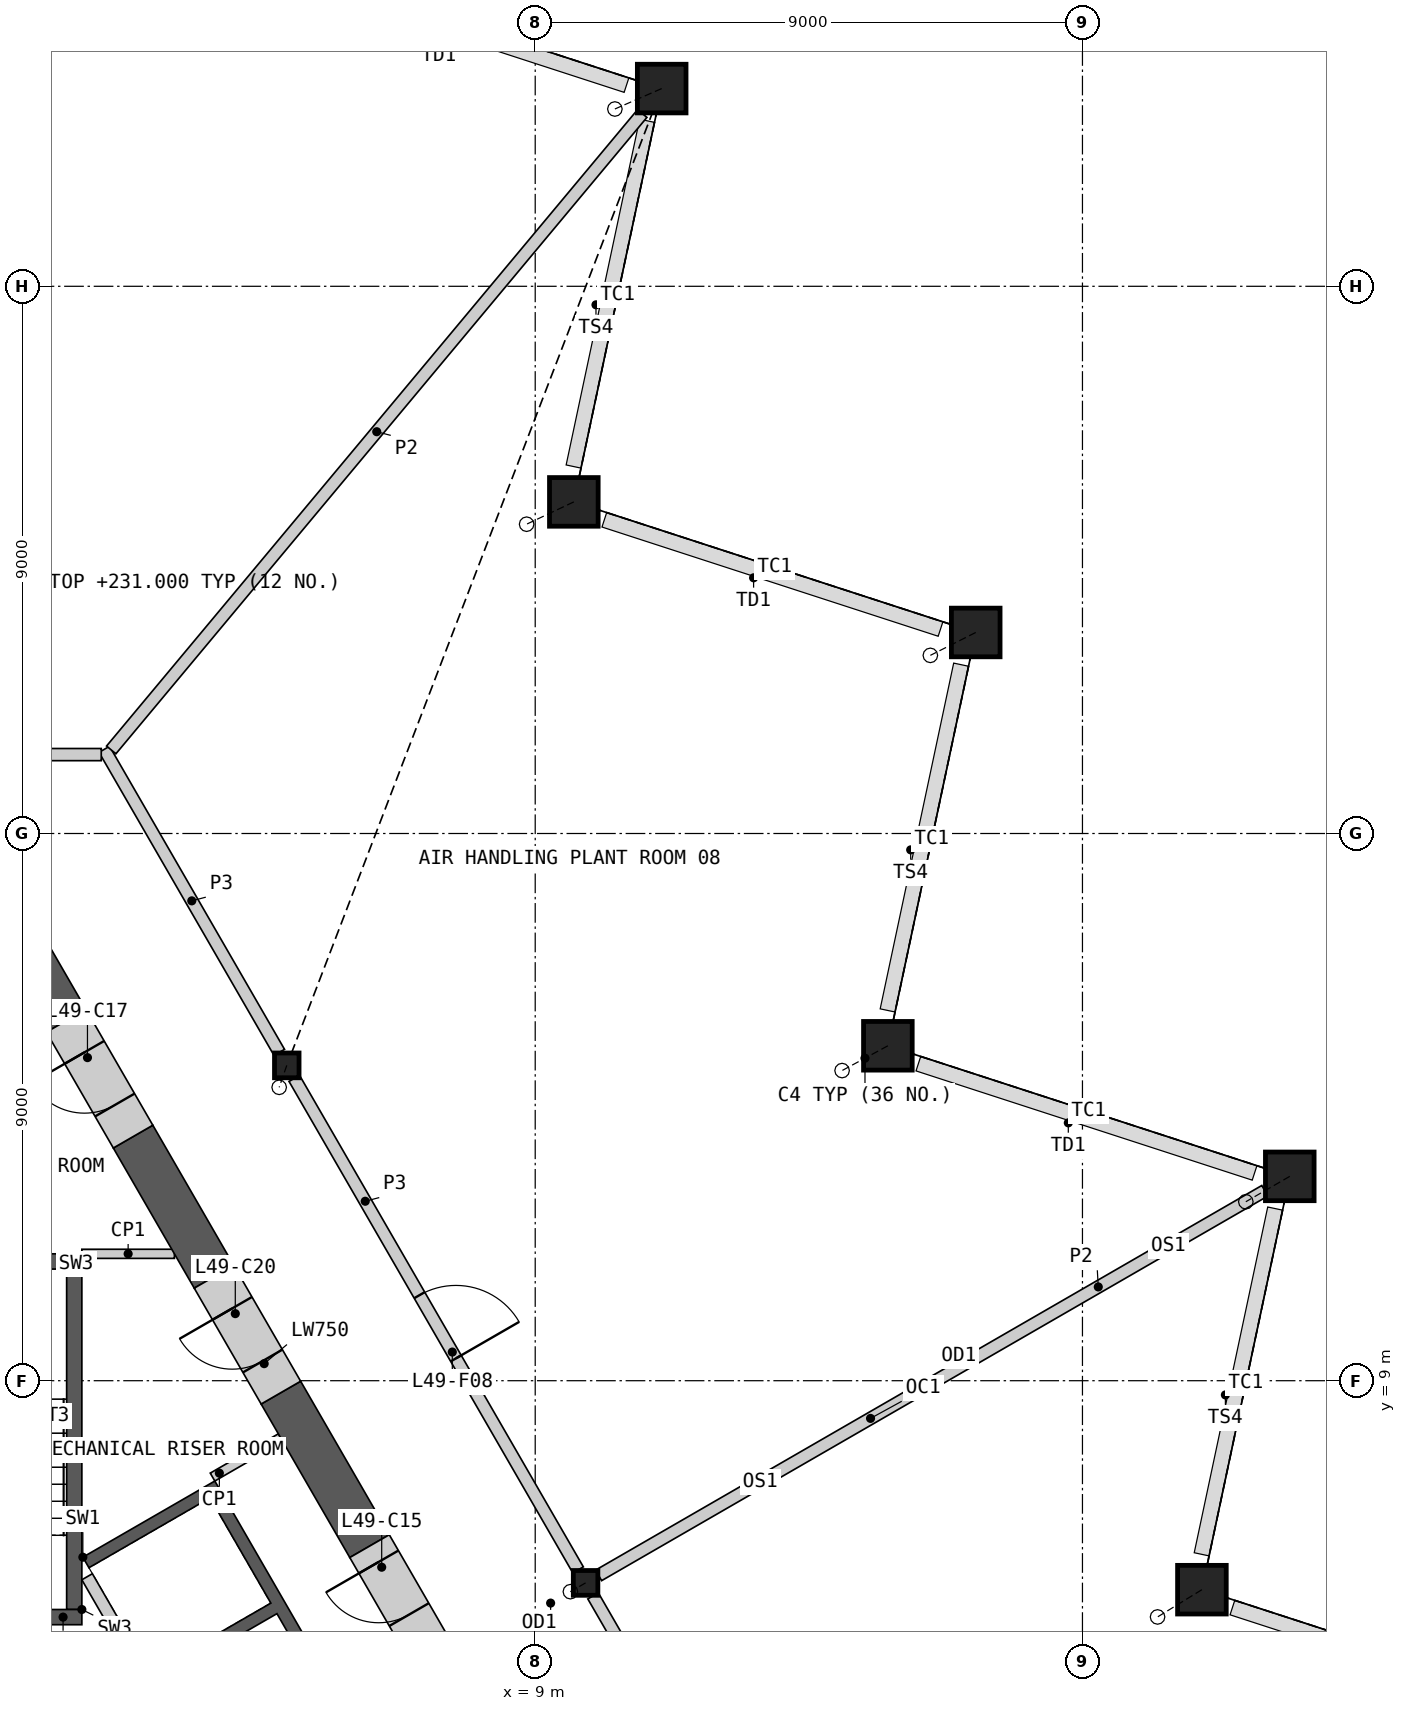
"""IFC4 building model, lengths in metres.
Left out: names, types, materials, properties, quantities, classifications, styles, units other than length and angle.
Written with IfcOpenShell. Run it as: python <this file> out.ifc"""

import sys

from ifc_helpers import new_model, si_unit, direction, frame, frame_2d, origin, origin_2d, place, context, subcontext, project, spatial, polyline, rectangle, hollow_rectangle, i_section, outline, extrude, element, fill, save


model = new_model("IFC4")
c1 = context("Model", 3, precision=1e-05, world=origin(), true_north=direction((0.0, 1.0)))
c2 = subcontext(c1, "Body", "Model", "MODEL_VIEW")
j1 = project(units=[si_unit("LENGTHUNIT", "METRE"), si_unit("PLANEANGLEUNIT", "RADIAN")], contexts=[c1])
p1 = place(None, origin())
s1 = spatial("IfcSite", under=j1, at=p1, CompositionType="ELEMENT")
p2 = place(p1, origin())
s2 = spatial("IfcBuilding", under=s1, at=p2, CompositionType="ELEMENT")
p3 = place(p2, frame((0.0, 0.0, 226.0)))
s3 = spatial("IfcBuildingStorey", under=s2, at=p3, CompositionType="ELEMENT", Elevation=226.0)
p4 = place(p3, frame((19.965, 5.563, 0.0), z_axis=(-0.143805256431, -0.088362266, 0.985653163222), x_axis=(0.52352457136, -0.852010576919, 0.0)))
e1 = element("IfcColumn", 1, at=p4, inside=s3, PredefinedType="COLUMN", context=c2, shape_type="SweptSolid", body=[
    extrude(hollow_rectangle(XDim=0.8, YDim=0.8, WallThickness=0.05, at=origin_2d()), frame((0.0, 0.0, 0.069)), (0.0, 0.0, 1.0), 4.936),
])
p5 = place(p3, frame((21.409, 12.361, 0.0), z_axis=(-0.142558983537, -0.082356710084, 0.986354048259), x_axis=(0.500228859883, -0.865893231143, 0.0)))
e2 = element("IfcColumn", 2, at=p5, inside=s3, PredefinedType="COLUMN", context=c2, shape_type="SweptSolid", body=[
    extrude(hollow_rectangle(XDim=0.8, YDim=0.8, WallThickness=0.05, at=origin_2d()), frame((0.0, 0.0, 0.067)), (0.0, 0.0, 1.0), 4.936),
])
p6 = place(p3, frame((14.8, 14.508, 0.0), z_axis=(-0.14842592214, -0.080325182896, 0.98565592913), x_axis=(0.475952391662, -0.879471046067, 0.0)))
e3 = element("IfcColumn", 3, at=p6, inside=s3, PredefinedType="COLUMN", context=c2, shape_type="SweptSolid", body=[
    extrude(hollow_rectangle(XDim=0.8, YDim=0.8, WallThickness=0.05, at=origin_2d()), frame((0.0, 0.0, 0.069)), (0.0, 0.0, 1.0), 4.936),
])
p7 = place(p3, frame((16.245, 21.306, 0.0), z_axis=(-0.147223782271, -0.074310204791, 0.986307838049), x_axis=(0.450597903076, -0.892727018603, 0.0)))
e4 = element("IfcColumn", 4, at=p7, inside=s3, PredefinedType="COLUMN", context=c2, shape_type="SweptSolid", body=[
    extrude(hollow_rectangle(XDim=0.8, YDim=0.8, WallThickness=0.05, at=origin_2d()), frame((0.0, 0.0, 0.067)), (0.0, 0.0, 1.0), 4.936),
])
p8 = place(p3, frame((9.635, 23.454, 0.0), z_axis=(-0.153080457926, -0.072281310218, 0.985566733202), x_axis=(0.426974022071, -0.90426389095, 0.0)))
e5 = element("IfcColumn", 5, at=p8, inside=s3, PredefinedType="COLUMN", context=c2, shape_type="SweptSolid", body=[
    extrude(hollow_rectangle(XDim=0.8, YDim=0.8, WallThickness=0.05, at=origin_2d()), frame((0.0, 0.0, 0.069)), (0.0, 0.0, 1.0), 4.936),
])
p9 = place(p3, frame((11.08, 30.252, 0.0), z_axis=(-0.151827964883, -0.066259207003, 0.986183546084), x_axis=(0.399979973786, -0.916523878887, 0.0)))
e6 = element("IfcColumn", 6, at=p9, inside=s3, PredefinedType="COLUMN", context=c2, shape_type="SweptSolid", body=[
    extrude(hollow_rectangle(XDim=0.8, YDim=0.8, WallThickness=0.05, at=origin_2d()), frame((0.0, 0.0, 0.067)), (0.0, 0.0, 1.0), 4.936),
])
p10 = place(p3, frame((9.828, 5.675, 0.0), z_axis=(-0.049916818753, -0.028858160841, 0.998336375055), x_axis=(0.500502949238, -0.865734831114, 0.0)))
e7 = element("IfcColumn", 7, at=p10, inside=s3, PredefinedType="COLUMN", context=c2, shape_type="SweptSolid", body=[
    extrude(i_section(OverallWidth=0.404, OverallDepth=0.407, WebThickness=0.027, FlangeThickness=0.044, at=origin_2d()), frame((0.0, 0.0, 0.012)), (0.0, 0.0, 1.0), 4.985),
])
p11 = place(p3, frame((4.914, 14.186, 0.0), z_axis=(-0.024927314899, -0.072006833468, 0.997092595954), x_axis=(0.944978476916, -0.327132508574, 0.0)))
e8 = element("IfcColumn", 8, at=p11, inside=s3, PredefinedType="COLUMN", context=c2, shape_type="SweptSolid", body=[
    extrude(i_section(OverallWidth=0.404, OverallDepth=0.407, WebThickness=0.027, FlangeThickness=0.044, at=origin_2d()), frame((0.0, 0.0, 0.016)), (0.0, 0.0, 1.0), 4.983),
])
p12 = place(p3, origin())
e9 = element("IfcWall", 9, at=p12, inside=s3, PredefinedType="SHEAR", context=c2, shape_type="SweptSolid", body=[
    extrude(outline(polyline([(1.561, 6.097), (3.731, 7.35), (7.131, 1.461), (4.96, 0.208), (4.861, 0.381), (6.852, 1.531), (4.752, 5.169), (2.76, 4.019), (2.66, 4.192), (4.652, 5.342), (3.652, 7.074), (1.66, 5.924), (1.561, 6.097)])), origin(), (0.0, 0.0, 1.0), 4.65),
])
p13 = place(p3, frame((5.817, -1.476, 0.0), z_axis=(0.0, 0.0, 1.0), x_axis=(-0.500002616675, 0.866023893041, 0.0)))
e10 = element("IfcWall", 10, at=p13, inside=s3, PredefinedType="SOLIDWALL", context=c2, shape_type="SweptSolid", body=[
    extrude(rectangle(XDim=8.373, YDim=0.2, at=frame_2d((4.187, 0.0))), origin(), (0.0, 0.0, 1.0), 4.65),
])
p14 = place(p13, frame((0.437, 0.0, 0.0)))
e11 = element("IfcOpeningElement", 11, at=p14, cuts=e10, PredefinedType="OPENING", context=c2, shape_type="SweptSolid", body=[
    extrude(rectangle(XDim=0.9, YDim=2.1, at=frame_2d((0.45, 1.05))), frame((0.0, 0.11, 0.0), z_axis=(0.0, -1.0, 0.0), x_axis=(1.0, 0.0, 0.0)), (0.0, 0.0, 1.0), 0.22),
])
p15 = place(p13, frame((3.737, 0.0, 0.0)))
e12 = element("IfcOpeningElement", 12, at=p15, cuts=e10, PredefinedType="OPENING", context=c2, shape_type="SweptSolid", body=[
    extrude(rectangle(XDim=0.9, YDim=2.1, at=frame_2d((0.45, 1.05))), frame((0.0, 0.11, 0.0), z_axis=(0.0, -1.0, 0.0), x_axis=(1.0, 0.0, 0.0)), (0.0, 0.0, 1.0), 0.22),
])
p16 = place(p3, origin())
e13 = element("IfcWall", 13, at=p16, inside=s3, PredefinedType="SHEAR", context=c2, shape_type="SweptSolid", body=[
    extrude(outline(polyline([(1.544, 5.237), (1.544, 11.087), (1.294, 10.837), (1.294, 5.237), (1.544, 5.237)])), origin(), (0.0, 0.0, 1.0), 4.65),
])
p17 = place(p3, origin())
e14 = element("IfcWall", 14, at=p17, inside=s3, PredefinedType="SHEAR", context=c2, shape_type="SweptSolid", body=[
    extrude(outline(polyline([(1.544, 11.087), (-1.544, 11.087), (-1.294, 10.837), (1.294, 10.837), (1.544, 11.087)])), origin(), (0.0, 0.0, 1.0), 4.65),
])
p18 = place(p3, frame((1.544, 5.112, 0.0), z_axis=(0.0, 0.0, 1.0), x_axis=(-1.0, 0.0, 0.0)))
e15 = element("IfcWall", 15, at=p18, inside=s3, PredefinedType="SHEAR", context=c2, shape_type="SweptSolid", body=[
    extrude(rectangle(XDim=3.088, YDim=0.25, at=frame_2d((1.544, 0.0))), origin(), (0.0, 0.0, 1.0), 4.65),
])
p19 = place(p18, frame((0.994, 0.0, 0.0)))
e16 = element("IfcOpeningElement", 16, at=p19, cuts=e15, PredefinedType="OPENING", context=c2, shape_type="SweptSolid", body=[
    extrude(rectangle(XDim=1.1, YDim=2.1, at=frame_2d((0.55, 1.05))), frame((0.0, 0.135, 0.0), z_axis=(0.0, -1.0, 0.0), x_axis=(1.0, 0.0, 0.0)), (0.0, 0.0, 1.0), 0.27),
])
p20 = place(p3, frame((3.693, 7.415, 0.0), z_axis=(0.0, 0.0, 1.0), x_axis=(0.866003189247, 0.500038474733, 0.0)))
e17 = element("IfcWall", 17, at=p20, inside=s3, PredefinedType="PARTITIONING", context=c2, shape_type="SweptSolid", body=[
    extrude(rectangle(XDim=1.293, YDim=0.15, at=frame_2d((0.646, 0.0))), origin(), (0.0, 0.0, 1.0), 4.65),
])
p21 = place(p3, frame((1.544, 11.087, 0.0), z_axis=(0.0, 0.0, 1.0), x_axis=(1.0, 0.0, 0.0)))
e18 = element("IfcWall", 18, at=p21, inside=s3, PredefinedType="PARTITIONING", context=c2, shape_type="SweptSolid", body=[
    extrude(rectangle(XDim=1.522, YDim=0.15, at=frame_2d((0.761, 0.0))), origin(), (0.0, 0.0, 1.0), 4.65),
])
p22 = place(p3, frame((6.275, 6.279, 0.0), z_axis=(0.0, 0.0, 1.0), x_axis=(-0.500029273391, 0.866008502124, 0.0)))
e19 = element("IfcWall", 19, at=p22, inside=s3, PredefinedType="SHEAR", context=c2, shape_type="SweptSolid", body=[
    extrude(rectangle(XDim=2.916, YDim=0.75, at=frame_2d((1.458, 0.0))), origin(), (0.0, 0.0, 1.0), 4.65),
])
p23 = place(p3, frame((3.717, 10.709, 0.0), z_axis=(0.0, 0.0, 1.0), x_axis=(-0.500005599468, 0.866022170906, 0.0)))
e20 = element("IfcWall", 20, at=p23, inside=s3, PredefinedType="SHEAR", context=c2, shape_type="SweptSolid", body=[
    extrude(rectangle(XDim=2.662, YDim=0.75, at=frame_2d((1.331, 0.0))), origin(), (0.0, 0.0, 1.0), 4.65),
])
p24 = place(p3, frame((1.286, 14.92, 0.0), z_axis=(0.0, 0.0, 1.0), x_axis=(-0.500030129425, 0.866008007854, 0.0)))
e21 = element("IfcWall", 21, at=p24, inside=s3, PredefinedType="SHEAR", context=c2, shape_type="SweptSolid", body=[
    extrude(rectangle(XDim=1.923, YDim=0.75, at=frame_2d((0.962, 0.0))), origin(), (0.0, 0.0, 1.0), 4.65),
])
p25 = place(p3, frame((7.375, 4.374, 0.0), z_axis=(0.0, 0.0, 1.0), x_axis=(-0.499946605688, 0.86605622881, 0.0)))
e22 = element("IfcWall", 22, at=p25, inside=s3, PredefinedType="SHEAR", context=c2, shape_type="SweptSolid", body=[
    extrude(rectangle(XDim=2.2, YDim=0.75, at=frame_2d((1.1, 0.0))), origin(), (0.0, 0.0, 1.0), 4.65),
])
p26 = place(p25, frame((0.9, 0.0, 0.0)))
e23 = element("IfcOpeningElement", 23, at=p26, cuts=e22, PredefinedType="OPENING", context=c2, shape_type="SweptSolid", body=[
    extrude(rectangle(XDim=1.0, YDim=2.1, at=frame_2d((0.5, 1.05))), frame((0.0, 0.385, 0.0), z_axis=(0.0, -1.0, 0.0), x_axis=(1.0, 0.0, 0.0)), (0.0, 0.0, 1.0), 0.77),
])
p27 = place(p3, frame((2.386, 13.015, 0.0), z_axis=(0.0, 0.0, 1.0), x_axis=(-0.499946605688, 0.86605622881, 0.0)))
e24 = element("IfcWall", 24, at=p27, inside=s3, PredefinedType="SHEAR", context=c2, shape_type="SweptSolid", body=[
    extrude(rectangle(XDim=2.2, YDim=0.75, at=frame_2d((1.1, 0.0))), origin(), (0.0, 0.0, 1.0), 4.65),
])
p28 = place(p27, frame((0.6, 0.0, 0.0)))
e25 = element("IfcOpeningElement", 25, at=p28, cuts=e24, PredefinedType="OPENING", context=c2, shape_type="SweptSolid", body=[
    extrude(rectangle(XDim=1.0, YDim=2.1, at=frame_2d((0.5, 1.05))), frame((0.0, 0.385, 0.0), z_axis=(0.0, -1.0, 0.0), x_axis=(1.0, 0.0, 0.0)), (0.0, 0.0, 1.0), 0.77),
])
p29 = place(p3, frame((4.817, 8.804, 0.0), z_axis=(0.0, 0.0, 1.0), x_axis=(-0.50002983664, 0.866008176907, 0.0)))
e26 = element("IfcWall", 26, at=p29, inside=s3, PredefinedType="SHEAR", context=c2, shape_type="SweptSolid", body=[
    extrude(rectangle(XDim=2.2, YDim=0.75, at=frame_2d((1.1, 0.0))), origin(), (0.0, 0.0, 1.0), 4.65),
])
p30 = place(p29, frame((0.6, 0.0, 0.0)))
e27 = element("IfcOpeningElement", 27, at=p30, cuts=e26, PredefinedType="OPENING", context=c2, shape_type="SweptSolid", body=[
    extrude(rectangle(XDim=1.0, YDim=2.1, at=frame_2d((0.5, 1.05))), frame((0.0, 0.385, 0.0), z_axis=(0.0, -1.0, 0.0), x_axis=(1.0, 0.0, 0.0)), (0.0, 0.0, 1.0), 0.77),
])
p31 = place(p3, frame((5.038, 13.972, 0.0), z_axis=(0.0, 0.0, 1.0), x_axis=(0.50000393355, -0.866023132736, 0.0)))
e28 = element("IfcWall", 28, at=p31, inside=s3, PredefinedType="PARTITIONING", context=c2, shape_type="SweptSolid", body=[
    extrude(rectangle(XDim=9.335, YDim=0.2, at=frame_2d((4.667, 0.0))), origin(), (0.0, 0.0, 1.0), 4.65),
])
p32 = place(p31, frame((4.118, 0.0, 0.0)))
e29 = element("IfcOpeningElement", 29, at=p32, cuts=e28, PredefinedType="OPENING", context=c2, shape_type="SweptSolid", body=[
    extrude(rectangle(XDim=1.2, YDim=2.1, at=frame_2d((0.6, 1.05))), frame((0.0, 0.11, 0.0), z_axis=(0.0, -1.0, 0.0), x_axis=(1.0, 0.0, 0.0)), (0.0, 0.0, 1.0), 0.22),
])
p33 = place(p3, frame((9.952, 5.461, 0.0), z_axis=(0.0, 0.0, 1.0), x_axis=(0.50000393355, -0.866023132736, 0.0)))
e30 = element("IfcWall", 30, at=p33, inside=s3, PredefinedType="PARTITIONING", context=c2, shape_type="SweptSolid", body=[
    extrude(rectangle(XDim=9.335, YDim=0.2, at=frame_2d((4.667, 0.0))), origin(), (0.0, 0.0, 1.0), 4.65),
])
p34 = place(p33, frame((4.017, 0.0, 0.0)))
e31 = element("IfcOpeningElement", 31, at=p34, cuts=e30, PredefinedType="OPENING", context=c2, shape_type="SweptSolid", body=[
    extrude(rectangle(XDim=1.2, YDim=2.1, at=frame_2d((0.6, 1.05))), frame((0.0, 0.11, 0.0), z_axis=(0.0, -1.0, 0.0), x_axis=(1.0, 0.0, 0.0)), (0.0, 0.0, 1.0), 0.22),
])
p35 = place(p3, frame((1.913, 19.385, 0.0), z_axis=(0.0, 0.0, 1.0), x_axis=(0.50000762079, -0.866021003874, 0.0)))
e32 = element("IfcWall", 32, at=p35, inside=s3, PredefinedType="PARTITIONING", context=c2, shape_type="SweptSolid", body=[
    extrude(rectangle(XDim=5.756, YDim=0.2, at=frame_2d((2.878, 0.0))), origin(), (0.0, 0.0, 1.0), 4.65),
])
p36 = place(p3, frame((-1.863, 19.298, 0.0), z_axis=(0.0, 0.0, 1.0), x_axis=(1.0, 0.0, 0.0)))
e33 = element("IfcWall", 33, at=p36, inside=s3, PredefinedType="PARTITIONING", context=c2, shape_type="SweptSolid", body=[
    extrude(rectangle(XDim=3.726, YDim=0.2, at=frame_2d((1.863, 0.0))), origin(), (0.0, 0.0, 1.0), 4.65),
])
p37 = place(p36, frame((0.201, 0.0, 0.0)))
e34 = element("IfcOpeningElement", 34, at=p37, cuts=e33, PredefinedType="OPENING", context=c2, shape_type="SweptSolid", body=[
    extrude(rectangle(XDim=1.2, YDim=2.1, at=frame_2d((0.6, 1.05))), frame((0.0, 0.11, 0.0), z_axis=(0.0, -1.0, 0.0), x_axis=(1.0, 0.0, 0.0)), (0.0, 0.0, 1.0), 0.22),
])
p38 = place(p3, frame((2.027, 19.375, 0.0), z_axis=(0.0, 0.0, 1.0), x_axis=(0.640645811519, 0.767836534806, 0.0)))
e35 = element("IfcWall", 35, at=p38, inside=s3, PredefinedType="PARTITIONING", context=c2, shape_type="SweptSolid", body=[
    extrude(rectangle(XDim=13.632, YDim=0.2, at=frame_2d((6.816, 0.0))), origin(), (0.0, 0.0, 1.0), 4.65),
])
p39 = place(p3, frame((10.042, 5.798, 0.0), z_axis=(0.0, 0.0, 1.0), x_axis=(0.866025883649, 0.499999168849, 0.0)))
e36 = element("IfcWall", 36, at=p39, inside=s3, PredefinedType="PARTITIONING", context=c2, shape_type="SweptSolid", body=[
    extrude(rectangle(XDim=12.652, YDim=0.2, at=frame_2d((6.326, 0.0))), origin(), (0.0, 0.0, 1.0), 4.65),
])
p40 = place(p26, origin())
e37 = element("IfcDoor", 37, at=p40, inside=s3, OperationType="SINGLE_SWING_RIGHT", PredefinedType="DOOR", context=c2, shape_type="SweptSolid", body=[
    extrude(rectangle(XDim=1.0, YDim=2.1, at=frame_2d((0.5, 1.05))), frame((0.0, 0.13, 0.0), z_axis=(0.0, -1.0, 0.0), x_axis=(1.0, 0.0, 0.0)), (0.0, 0.0, 1.0), 0.05),
])
fill(e23, e37)
p41 = place(p28, origin())
e38 = element("IfcDoor", 38, at=p41, inside=s3, OperationType="SINGLE_SWING_RIGHT", PredefinedType="DOOR", context=c2, shape_type="SweptSolid", body=[
    extrude(rectangle(XDim=1.0, YDim=2.1, at=frame_2d((0.5, 1.05))), frame((0.0, 0.13, 0.0), z_axis=(0.0, -1.0, 0.0), x_axis=(1.0, 0.0, 0.0)), (0.0, 0.0, 1.0), 0.05),
])
fill(e25, e38)
p42 = place(p30, origin())
e39 = element("IfcDoor", 39, at=p42, inside=s3, OperationType="SINGLE_SWING_RIGHT", PredefinedType="DOOR", context=c2, shape_type="SweptSolid", body=[
    extrude(rectangle(XDim=1.0, YDim=2.1, at=frame_2d((0.5, 1.05))), frame((0.0, 0.13, 0.0), z_axis=(0.0, -1.0, 0.0), x_axis=(1.0, 0.0, 0.0)), (0.0, 0.0, 1.0), 0.05),
])
fill(e27, e39)
p43 = place(p32, origin())
e40 = element("IfcDoor", 40, at=p43, inside=s3, OperationType="SINGLE_SWING_RIGHT", PredefinedType="DOOR", context=c2, shape_type="SweptSolid", body=[
    extrude(rectangle(XDim=1.2, YDim=2.1, at=frame_2d((0.6, 1.05))), frame((0.0, 0.025, 0.0), z_axis=(0.0, -1.0, 0.0), x_axis=(1.0, 0.0, 0.0)), (0.0, 0.0, 1.0), 0.05),
])
fill(e29, e40)
save(model, sys.argv[1])
